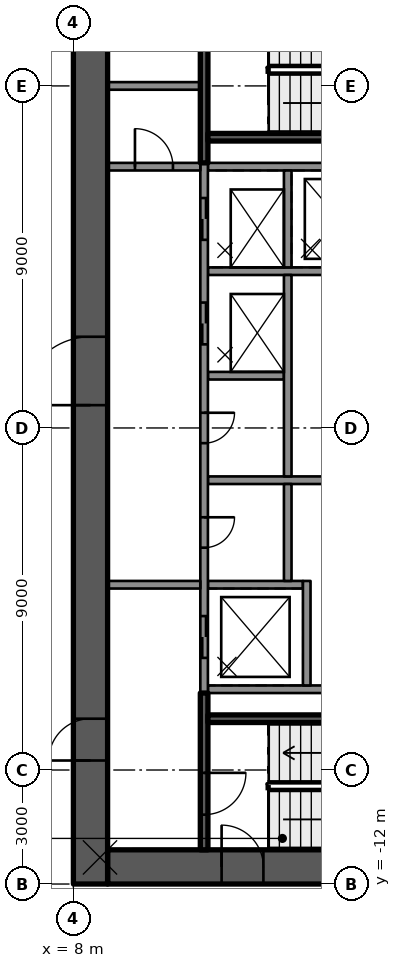
"""IFC4 building model, lengths in metres.
Left out: names, types, materials, properties, quantities, classifications, styles, units other than length and angle.
Written with IfcOpenShell. Run it as: python <this file> out.ifc"""

import sys

from ifc_helpers import new_model, si_unit, direction, frame, frame_2d, origin, place, context, subcontext, project, spatial, rectangle, extrude, element, fill, save


model = new_model("IFC4")
c1 = context("Model", 3, precision=1e-05, world=origin(), true_north=direction((0.0, 1.0)))
c2 = subcontext(c1, "Body", "Model", "MODEL_VIEW")
j1 = project(units=[si_unit("LENGTHUNIT", "METRE"), si_unit("PLANEANGLEUNIT", "RADIAN")], contexts=[c1])
p1 = place(None, origin())
s1 = spatial("IfcSite", under=j1, at=p1, CompositionType="ELEMENT")
p2 = place(p1, origin())
s2 = spatial("IfcBuilding", under=s1, at=p2, CompositionType="ELEMENT")
p3 = place(p2, frame((0.0, 0.0, 296.4)))
s3 = spatial("IfcBuildingStorey", under=s2, at=p3, CompositionType="ELEMENT", Elevation=296.4)
p4 = place(p3, frame((8.9, -11.55, 0.0), z_axis=(0.0, 0.0, 1.0), x_axis=(1.0, 0.0, 0.0)))
e1 = element("IfcWall", 1, at=p4, inside=s3, PredefinedType="SHEAR", context=c2, shape_type="SweptSolid", body=[
    extrude(rectangle(XDim=9.2, YDim=0.9, at=frame_2d((4.6, 0.0))), origin(), (0.0, 0.0, 1.0), 3.5),
])
p5 = place(p4, frame((3.0, 0.0, 0.0)))
e2 = element("IfcOpeningElement", 2, at=p5, cuts=e1, PredefinedType="OPENING", context=c2, shape_type="SweptSolid", body=[
    extrude(rectangle(XDim=1.1, YDim=2.1, at=frame_2d((0.55, 1.05))), frame((0.0, 0.46, 0.0), z_axis=(0.0, -1.0, 0.0), x_axis=(1.0, 0.0, 0.0)), (0.0, 0.0, 1.0), 0.92),
])
p6 = place(p3, frame((8.45, -12.0, 0.0), z_axis=(0.0, 0.0, 1.0), x_axis=(0.0, 1.0, 0.0)))
e3 = element("IfcWall", 3, at=p6, inside=s3, PredefinedType="SHEAR", context=c2, shape_type="SweptSolid", body=[
    extrude(rectangle(XDim=24.0, YDim=0.9, at=frame_2d((12.0, 0.0))), origin(), (0.0, 0.0, 1.0), 3.5),
])
p7 = place(p6, frame((12.6, 0.0, 0.0)))
e4 = element("IfcOpeningElement", 4, at=p7, cuts=e3, PredefinedType="OPENING", context=c2, shape_type="SweptSolid", body=[
    extrude(rectangle(XDim=1.8, YDim=2.1, at=frame_2d((0.9, 1.05))), frame((0.0, 0.46, 0.0), z_axis=(0.0, -1.0, 0.0), x_axis=(1.0, 0.0, 0.0)), (0.0, 0.0, 1.0), 0.92),
])
p8 = place(p6, frame((3.25, 0.0, 0.0)))
e5 = element("IfcOpeningElement", 5, at=p8, cuts=e3, PredefinedType="OPENING", context=c2, shape_type="SweptSolid", body=[
    extrude(rectangle(XDim=1.1, YDim=2.1, at=frame_2d((0.55, 1.05))), frame((0.0, 0.46, 0.0), z_axis=(0.0, -1.0, 0.0), x_axis=(1.0, 0.0, 0.0)), (0.0, 0.0, 1.0), 0.92),
])
for number, where, z_axis, x_axis in (
    (6, (11.54, -6.875, 0.0), (0.0, 0.0, 1.0), (1.0, 0.0, 0.0)),
    (7, (11.54, 6.875, 0.0), (0.0, 0.0, 1.0), (1.0, 0.0, 0.0)),
):
    element("IfcWall", number, at=place(p3, frame(where, z_axis=z_axis, x_axis=x_axis)), inside=s3, PredefinedType="SOLIDWALL", context=c2, shape_type="SweptSolid", body=[
        extrude(rectangle(XDim=6.56, YDim=0.2, at=frame_2d((3.28, 0.0))), origin(), (0.0, 0.0, 1.0), 3.05),
    ])
p9 = place(p3, frame((11.54, 4.125, 0.0), z_axis=(0.0, 0.0, 1.0), x_axis=(1.0, 0.0, 0.0)))
e8 = element("IfcWall", 8, at=p9, inside=s3, PredefinedType="SOLIDWALL", context=c2, shape_type="SweptSolid", body=[
    extrude(rectangle(XDim=4.7, YDim=0.2, at=frame_2d((2.35, 0.0))), origin(), (0.0, 0.0, 1.0), 3.05),
])
p10 = place(p3, frame((11.54, 1.375, 0.0), z_axis=(0.0, 0.0, 1.0), x_axis=(1.0, 0.0, 0.0)))
e9 = element("IfcWall", 9, at=p10, inside=s3, PredefinedType="SOLIDWALL", context=c2, shape_type="SweptSolid", body=[
    extrude(rectangle(XDim=2.0, YDim=0.2, at=frame_2d((1.0, 0.0))), origin(), (0.0, 0.0, 1.0), 3.05),
])
p11 = place(p3, frame((11.54, -1.375, 0.0), z_axis=(0.0, 0.0, 1.0), x_axis=(1.0, 0.0, 0.0)))
e10 = element("IfcWall", 10, at=p11, inside=s3, PredefinedType="SOLIDWALL", context=c2, shape_type="SweptSolid", body=[
    extrude(rectangle(XDim=4.2, YDim=0.2, at=frame_2d((2.1, 0.0))), origin(), (0.0, 0.0, 1.0), 3.05),
])
p12 = place(p3, frame((11.54, -4.125, 0.0), z_axis=(0.0, 0.0, 1.0), x_axis=(1.0, 0.0, 0.0)))
e11 = element("IfcWall", 11, at=p12, inside=s3, PredefinedType="SOLIDWALL", context=c2, shape_type="SweptSolid", body=[
    extrude(rectangle(XDim=2.5, YDim=0.2, at=frame_2d((1.25, 0.0))), origin(), (0.0, 0.0, 1.0), 3.05),
])
p13 = place(p3, frame((11.44, 6.975, 0.0), z_axis=(0.0, 0.0, 1.0), x_axis=(0.0, -1.0, 0.0)))
e12 = element("IfcWall", 12, at=p13, inside=s3, PredefinedType="SOLIDWALL", context=c2, shape_type="SweptSolid", body=[
    extrude(rectangle(XDim=13.95, YDim=0.2, at=frame_2d((6.975, 0.0))), origin(), (0.0, 0.0, 1.0), 3.05),
])
p14 = place(p13, frame((0.925, 0.0, 0.0)))
e13 = element("IfcOpeningElement", 13, at=p14, cuts=e12, PredefinedType="OPENING", context=c2, shape_type="SweptSolid", body=[
    extrude(rectangle(XDim=1.1, YDim=2.1, at=frame_2d((0.55, 1.05))), frame((0.0, 0.11, 0.0), z_axis=(0.0, -1.0, 0.0), x_axis=(1.0, 0.0, 0.0)), (0.0, 0.0, 1.0), 0.22),
])
p15 = place(p13, frame((3.675, 0.0, 0.0)))
e14 = element("IfcOpeningElement", 14, at=p15, cuts=e12, PredefinedType="OPENING", context=c2, shape_type="SweptSolid", body=[
    extrude(rectangle(XDim=1.1, YDim=2.1, at=frame_2d((0.55, 1.05))), frame((0.0, 0.11, 0.0), z_axis=(0.0, -1.0, 0.0), x_axis=(1.0, 0.0, 0.0)), (0.0, 0.0, 1.0), 0.22),
])
p16 = place(p13, frame((11.925, 0.0, 0.0)))
e15 = element("IfcOpeningElement", 15, at=p16, cuts=e12, PredefinedType="OPENING", context=c2, shape_type="SweptSolid", body=[
    extrude(rectangle(XDim=1.1, YDim=2.1, at=frame_2d((0.55, 1.05))), frame((0.0, 0.11, 0.0), z_axis=(0.0, -1.0, 0.0), x_axis=(1.0, 0.0, 0.0)), (0.0, 0.0, 1.0), 0.22),
])
p17 = place(p13, frame((6.575, 0.0, 0.0)))
e16 = element("IfcOpeningElement", 16, at=p17, cuts=e12, PredefinedType="OPENING", context=c2, shape_type="SweptSolid", body=[
    extrude(rectangle(XDim=0.8, YDim=2.1, at=frame_2d((0.4, 1.05))), frame((0.0, 0.11, 0.0), z_axis=(0.0, -1.0, 0.0), x_axis=(1.0, 0.0, 0.0)), (0.0, 0.0, 1.0), 0.22),
])
p18 = place(p13, frame((9.325, 0.0, 0.0)))
e17 = element("IfcOpeningElement", 17, at=p18, cuts=e12, PredefinedType="OPENING", context=c2, shape_type="SweptSolid", body=[
    extrude(rectangle(XDim=0.8, YDim=2.1, at=frame_2d((0.4, 1.05))), frame((0.0, 0.11, 0.0), z_axis=(0.0, -1.0, 0.0), x_axis=(1.0, 0.0, 0.0)), (0.0, 0.0, 1.0), 0.22),
])
p19 = place(p3, frame((13.64, 6.775, 0.0), z_axis=(0.0, 0.0, 1.0), x_axis=(0.0, -1.0, 0.0)))
e18 = element("IfcWall", 18, at=p19, inside=s3, PredefinedType="SOLIDWALL", context=c2, shape_type="SweptSolid", body=[
    extrude(rectangle(XDim=2.55, YDim=0.2, at=frame_2d((1.275, 0.0))), origin(), (0.0, 0.0, 1.0), 3.05),
])
p20 = place(p3, frame((13.64, 4.025, 0.0), z_axis=(0.0, 0.0, 1.0), x_axis=(0.0, -1.0, 0.0)))
e19 = element("IfcWall", 19, at=p20, inside=s3, PredefinedType="SOLIDWALL", context=c2, shape_type="SweptSolid", body=[
    extrude(rectangle(XDim=5.3, YDim=0.2, at=frame_2d((2.65, 0.0))), origin(), (0.0, 0.0, 1.0), 3.05),
])
p21 = place(p3, frame((13.64, -1.475, 0.0), z_axis=(0.0, 0.0, 1.0), x_axis=(0.0, -1.0, 0.0)))
e20 = element("IfcWall", 20, at=p21, inside=s3, PredefinedType="SOLIDWALL", context=c2, shape_type="SweptSolid", body=[
    extrude(rectangle(XDim=2.55, YDim=0.2, at=frame_2d((1.275, 0.0))), origin(), (0.0, 0.0, 1.0), 3.05),
])
p22 = place(p3, frame((14.14, -4.025, 0.0), z_axis=(0.0, 0.0, 1.0), x_axis=(0.0, -1.0, 0.0)))
e21 = element("IfcWall", 21, at=p22, inside=s3, PredefinedType="SOLIDWALL", context=c2, shape_type="SweptSolid", body=[
    extrude(rectangle(XDim=2.75, YDim=0.2, at=frame_2d((1.375, 0.0))), origin(), (0.0, 0.0, 1.0), 3.05),
])
p23 = place(p3, frame((11.44, -6.975, 0.0), z_axis=(0.0, 0.0, 1.0), x_axis=(0.0, -1.0, 0.0)))
e22 = element("IfcWall", 22, at=p23, inside=s3, PredefinedType="SOLIDWALL", context=c2, shape_type="SweptSolid", body=[
    extrude(rectangle(XDim=4.125, YDim=0.2, at=frame_2d((2.062, 0.0))), origin(), (0.0, 0.0, 1.0), 3.05),
])
p24 = place(p23, frame((2.1, 0.0, 0.0)))
e23 = element("IfcOpeningElement", 23, at=p24, cuts=e22, PredefinedType="OPENING", context=c2, shape_type="SweptSolid", body=[
    extrude(rectangle(XDim=1.1, YDim=2.1, at=frame_2d((0.55, 1.05))), frame((0.0, 0.11, 0.0), z_axis=(0.0, -1.0, 0.0), x_axis=(1.0, 0.0, 0.0)), (0.0, 0.0, 1.0), 0.22),
])
p25 = place(p3, frame((11.54, -7.65, 0.0), z_axis=(0.0, 0.0, 1.0), x_axis=(1.0, 0.0, 0.0)))
e24 = element("IfcWall", 24, at=p25, inside=s3, PredefinedType="SOLIDWALL", context=c2, shape_type="SweptSolid", body=[
    extrude(rectangle(XDim=6.56, YDim=0.2, at=frame_2d((3.28, 0.0))), origin(), (0.0, 0.0, 1.0), 3.05),
])
p26 = place(p3, frame((11.44, 11.1, 0.0), z_axis=(0.0, 0.0, 1.0), x_axis=(0.0, -1.0, 0.0)))
e25 = element("IfcWall", 25, at=p26, inside=s3, PredefinedType="SOLIDWALL", context=c2, shape_type="SweptSolid", body=[
    extrude(rectangle(XDim=4.125, YDim=0.2, at=frame_2d((2.062, 0.0))), origin(), (0.0, 0.0, 1.0), 3.05),
])
p27 = place(p3, frame((11.54, 7.65, 0.0), z_axis=(0.0, 0.0, 1.0), x_axis=(1.0, 0.0, 0.0)))
e26 = element("IfcWall", 26, at=p27, inside=s3, PredefinedType="SOLIDWALL", context=c2, shape_type="SweptSolid", body=[
    extrude(rectangle(XDim=6.56, YDim=0.2, at=frame_2d((3.28, 0.0))), origin(), (0.0, 0.0, 1.0), 3.05),
])
p28 = place(p3, frame((8.9, -4.125, 0.0), z_axis=(0.0, 0.0, 1.0), x_axis=(1.0, 0.0, 0.0)))
e27 = element("IfcWall", 27, at=p28, inside=s3, PredefinedType="PARTITIONING", context=c2, shape_type="SweptSolid", body=[
    extrude(rectangle(XDim=2.44, YDim=0.2, at=frame_2d((1.22, 0.0))), origin(), (0.0, 0.0, 1.0), 3.05),
])
p29 = place(p3, frame((8.9, 6.875, 0.0), z_axis=(0.0, 0.0, 1.0), x_axis=(1.0, 0.0, 0.0)))
e28 = element("IfcWall", 28, at=p29, inside=s3, PredefinedType="PARTITIONING", context=c2, shape_type="SweptSolid", body=[
    extrude(rectangle(XDim=2.44, YDim=0.2, at=frame_2d((1.22, 0.0))), origin(), (0.0, 0.0, 1.0), 3.05),
])
p30 = place(p29, frame((0.72, 0.0, 0.0)))
e29 = element("IfcOpeningElement", 29, at=p30, cuts=e28, PredefinedType="OPENING", context=c2, shape_type="SweptSolid", body=[
    extrude(rectangle(XDim=1.0, YDim=2.1, at=frame_2d((0.5, 1.05))), frame((0.0, 0.11, 0.0), z_axis=(0.0, -1.0, 0.0), x_axis=(1.0, 0.0, 0.0)), (0.0, 0.0, 1.0), 0.22),
])
p31 = place(p3, frame((8.9, 9.0, 0.0), z_axis=(0.0, 0.0, 1.0), x_axis=(1.0, 0.0, 0.0)))
e30 = element("IfcWall", 30, at=p31, inside=s3, PredefinedType="PARTITIONING", context=c2, shape_type="SweptSolid", body=[
    extrude(rectangle(XDim=2.44, YDim=0.2, at=frame_2d((1.22, 0.0))), origin(), (0.0, 0.0, 1.0), 3.05),
])
p32 = place(p14, origin())
e31 = element("IfcDoor", 31, at=p32, inside=s3, OperationType="DOUBLE_DOOR_SLIDING", PredefinedType="DOOR", context=c2, shape_type="SweptSolid", body=[
    extrude(rectangle(XDim=1.1, YDim=2.1, at=frame_2d((0.55, 1.05))), frame((0.0, 0.025, 0.0), z_axis=(0.0, -1.0, 0.0), x_axis=(1.0, 0.0, 0.0)), (0.0, 0.0, 1.0), 0.05),
])
fill(e13, e31)
p33 = place(p15, origin())
e32 = element("IfcDoor", 32, at=p33, inside=s3, OperationType="DOUBLE_DOOR_SLIDING", PredefinedType="DOOR", context=c2, shape_type="SweptSolid", body=[
    extrude(rectangle(XDim=1.1, YDim=2.1, at=frame_2d((0.55, 1.05))), frame((0.0, 0.025, 0.0), z_axis=(0.0, -1.0, 0.0), x_axis=(1.0, 0.0, 0.0)), (0.0, 0.0, 1.0), 0.05),
])
fill(e14, e32)
p34 = place(p16, origin())
e33 = element("IfcDoor", 33, at=p34, inside=s3, OperationType="DOUBLE_DOOR_SLIDING", PredefinedType="DOOR", context=c2, shape_type="SweptSolid", body=[
    extrude(rectangle(XDim=1.1, YDim=2.1, at=frame_2d((0.55, 1.05))), frame((0.0, 0.025, 0.0), z_axis=(0.0, -1.0, 0.0), x_axis=(1.0, 0.0, 0.0)), (0.0, 0.0, 1.0), 0.05),
])
fill(e15, e33)
p35 = place(p17, origin())
e34 = element("IfcDoor", 34, at=p35, inside=s3, OperationType="SINGLE_SWING_LEFT", PredefinedType="DOOR", context=c2, shape_type="SweptSolid", body=[
    extrude(rectangle(XDim=0.8, YDim=2.1, at=frame_2d((0.4, 1.05))), frame((0.0, 0.025, 0.0), z_axis=(0.0, -1.0, 0.0), x_axis=(1.0, 0.0, 0.0)), (0.0, 0.0, 1.0), 0.05),
])
fill(e16, e34)
p36 = place(p18, origin())
e35 = element("IfcDoor", 35, at=p36, inside=s3, OperationType="SINGLE_SWING_LEFT", PredefinedType="DOOR", context=c2, shape_type="SweptSolid", body=[
    extrude(rectangle(XDim=0.8, YDim=2.1, at=frame_2d((0.4, 1.05))), frame((0.0, 0.025, 0.0), z_axis=(0.0, -1.0, 0.0), x_axis=(1.0, 0.0, 0.0)), (0.0, 0.0, 1.0), 0.05),
])
fill(e17, e35)
p37 = place(p7, origin())
e36 = element("IfcDoor", 36, at=p37, inside=s3, OperationType="SINGLE_SWING_RIGHT", PredefinedType="DOOR", context=c2, shape_type="SweptSolid", body=[
    extrude(rectangle(XDim=1.8, YDim=2.1, at=frame_2d((0.9, 1.05))), frame((0.0, 0.025, 0.0), z_axis=(0.0, -1.0, 0.0), x_axis=(1.0, 0.0, 0.0)), (0.0, 0.0, 1.0), 0.05),
])
fill(e4, e36)
p38 = place(p8, origin())
e37 = element("IfcDoor", 37, at=p38, inside=s3, OperationType="SINGLE_SWING_LEFT", PredefinedType="DOOR", context=c2, shape_type="SweptSolid", body=[
    extrude(rectangle(XDim=1.1, YDim=2.1, at=frame_2d((0.55, 1.05))), frame((0.0, 0.025, 0.0), z_axis=(0.0, -1.0, 0.0), x_axis=(1.0, 0.0, 0.0)), (0.0, 0.0, 1.0), 0.05),
])
fill(e5, e37)
p39 = place(p5, origin())
e38 = element("IfcDoor", 38, at=p39, inside=s3, OperationType="SINGLE_SWING_LEFT", PredefinedType="DOOR", context=c2, shape_type="SweptSolid", body=[
    extrude(rectangle(XDim=1.1, YDim=2.1, at=frame_2d((0.55, 1.05))), frame((0.0, 0.025, 0.0), z_axis=(0.0, -1.0, 0.0), x_axis=(1.0, 0.0, 0.0)), (0.0, 0.0, 1.0), 0.05),
])
fill(e2, e38)
p40 = place(p24, origin())
e39 = element("IfcDoor", 39, at=p40, inside=s3, OperationType="SINGLE_SWING_RIGHT", PredefinedType="DOOR", context=c2, shape_type="SweptSolid", body=[
    extrude(rectangle(XDim=1.1, YDim=2.1, at=frame_2d((0.55, 1.05))), frame((0.0, 0.025, 0.0), z_axis=(0.0, -1.0, 0.0), x_axis=(1.0, 0.0, 0.0)), (0.0, 0.0, 1.0), 0.05),
])
fill(e23, e39)
p41 = place(p30, origin())
e40 = element("IfcDoor", 40, at=p41, inside=s3, OperationType="SINGLE_SWING_RIGHT", PredefinedType="DOOR", context=c2, shape_type="SweptSolid", body=[
    extrude(rectangle(XDim=1.0, YDim=2.1, at=frame_2d((0.5, 1.05))), frame((0.0, 0.025, 0.0), z_axis=(0.0, -1.0, 0.0), x_axis=(1.0, 0.0, 0.0)), (0.0, 0.0, 1.0), 0.05),
])
fill(e29, e40)
save(model, sys.argv[1])
